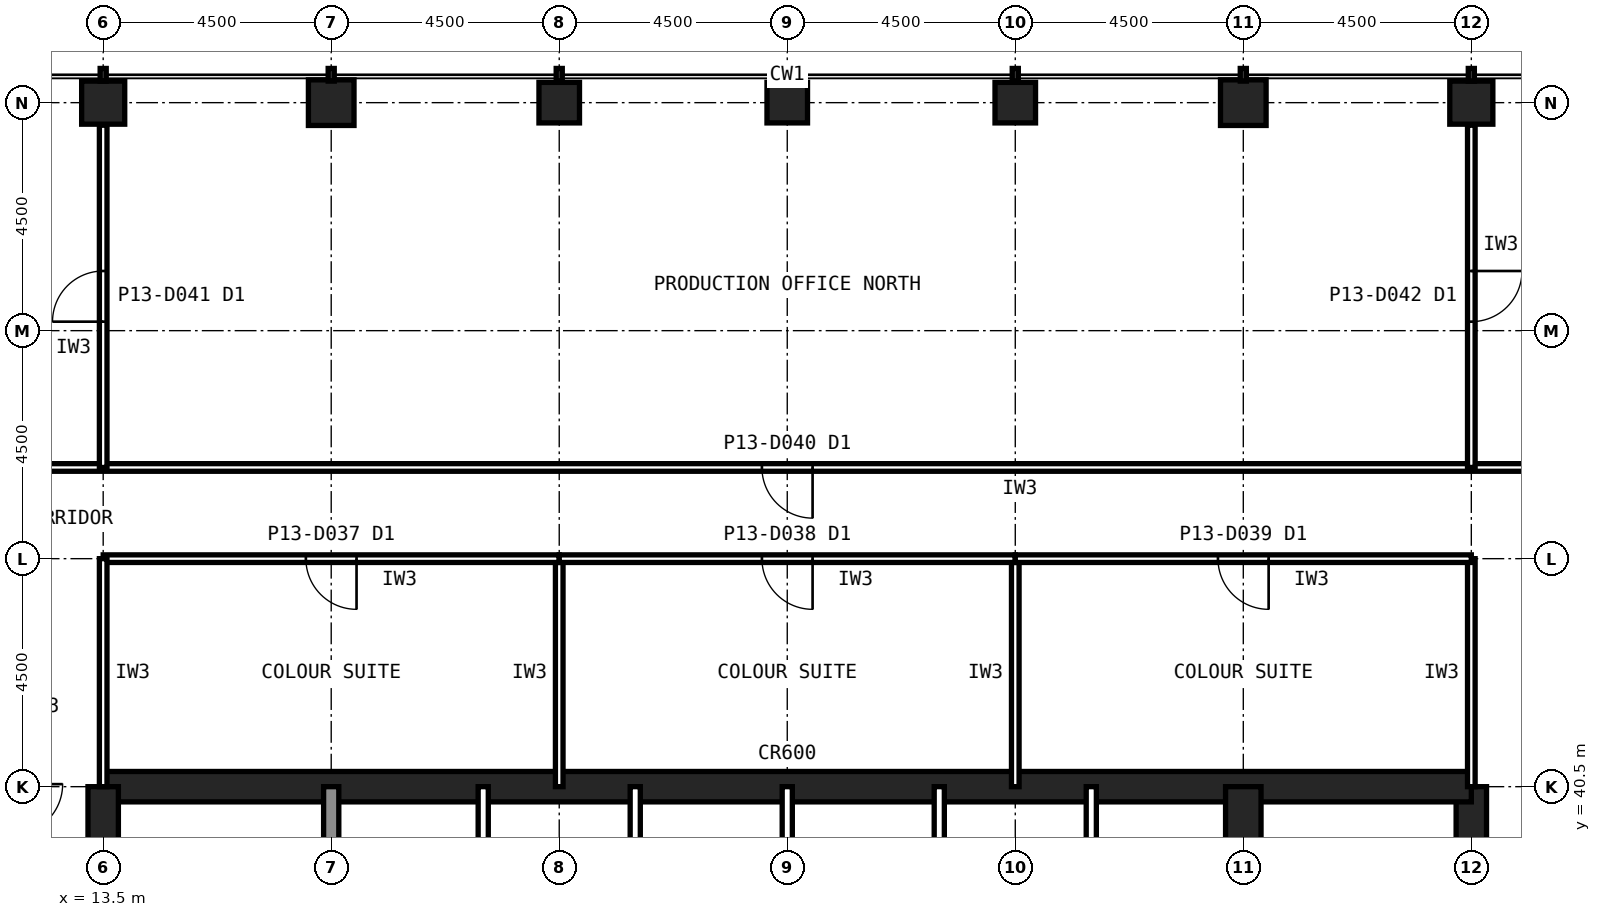
"""IFC4 building model, lengths in metres.
Left out: names, types, materials, properties, quantities, classifications, styles, units other than length and angle.
Written with IfcOpenShell. Run it as: python <this file> out.ifc"""

import sys

from ifc_helpers import new_model, si_unit, direction, frame, frame_2d, origin, origin_2d, place, context, subcontext, project, spatial, rectangle, hollow_rectangle, extrude, element, fill, save


model = new_model("IFC4")
c1 = context("Model", 3, precision=1e-05, world=origin(), true_north=direction((0.0, 1.0)))
c2 = subcontext(c1, "Body", "Model", "MODEL_VIEW")
j1 = project(units=[si_unit("LENGTHUNIT", "METRE"), si_unit("PLANEANGLEUNIT", "RADIAN")], contexts=[c1])
p1 = place(None, origin())
s1 = spatial("IfcSite", under=j1, at=p1, CompositionType="ELEMENT")
p2 = place(p1, origin())
s2 = spatial("IfcBuilding", under=s1, at=p2, CompositionType="ELEMENT")
p3 = place(p2, frame((0.0, 0.0, 54.2)))
s3 = spatial("IfcBuildingStorey", under=s2, at=p3, CompositionType="ELEMENT", Elevation=54.2)
p4 = place(p3, frame((40.5, 54.0, 0.0), z_axis=(0.0, 0.0, 1.0), x_axis=(1.0, 0.0, 0.0)))
e1 = element("IfcColumn", 1, at=p4, inside=s3, PredefinedType="COLUMN", context=c2, shape_type="SweptSolid", body=[
    extrude(hollow_rectangle(XDim=0.85, YDim=0.85, WallThickness=0.05, at=origin_2d()), origin(), (0.0, 0.0, 1.0), 4.2),
])
p5 = place(p3, frame((36.0, 54.0, 0.0), z_axis=(0.0, 0.0, 1.0), x_axis=(1.0, 0.0, 0.0)))
e2 = element("IfcColumn", 2, at=p5, inside=s3, PredefinedType="COLUMN", context=c2, shape_type="SweptSolid", body=[
    extrude(hollow_rectangle(XDim=0.9, YDim=0.9, WallThickness=0.063, at=origin_2d()), origin(), (0.0, 0.0, 1.0), 4.2),
])
for number, where, z_axis, x_axis in (
    (3, (31.5, 54.0, 0.0), (0.0, 0.0, 1.0), (1.0, 0.0, 0.0)),
    (4, (27.0, 54.0, 0.0), (0.0, 0.0, 1.0), (1.0, 0.0, 0.0)),
    (5, (22.5, 54.0, 0.0), (0.0, 0.0, 1.0), (1.0, 0.0, 0.0)),
):
    element("IfcColumn", number, at=place(p3, frame(where, z_axis=z_axis, x_axis=x_axis)), inside=s3, PredefinedType="COLUMN", context=c2, shape_type="SweptSolid", body=[
        extrude(hollow_rectangle(XDim=0.8, YDim=0.8, WallThickness=0.045, at=origin_2d()), origin(), (0.0, 0.0, 1.0), 4.2),
    ])
p6 = place(p3, frame((18.0, 54.0, 0.0), z_axis=(0.0, 0.0, 1.0), x_axis=(1.0, 0.0, 0.0)))
e6 = element("IfcColumn", 6, at=p6, inside=s3, PredefinedType="COLUMN", context=c2, shape_type="SweptSolid", body=[
    extrude(hollow_rectangle(XDim=0.9, YDim=0.9, WallThickness=0.063, at=origin_2d()), origin(), (0.0, 0.0, 1.0), 4.2),
])
p7 = place(p3, frame((13.5, 54.0, 0.0), z_axis=(0.0, 0.0, 1.0), x_axis=(1.0, 0.0, 0.0)))
e7 = element("IfcColumn", 7, at=p7, inside=s3, PredefinedType="COLUMN", context=c2, shape_type="SweptSolid", body=[
    extrude(hollow_rectangle(XDim=0.85, YDim=0.85, WallThickness=0.05, at=origin_2d()), origin(), (0.0, 0.0, 1.0), 4.2),
])
p8 = place(p3, frame((40.5, 13.5, 0.0), z_axis=(0.0, 0.0, 1.0), x_axis=(0.0, 1.0, 0.0)))
e8 = element("IfcWall", 8, at=p8, inside=s3, PredefinedType="SHEAR", context=c2, shape_type="SweptSolid", body=[
    extrude(rectangle(XDim=27.0, YDim=0.6, at=frame_2d((13.5, 0.0))), origin(), (0.0, 0.0, 1.0), 4.2),
])
p9 = place(p8, frame((5.85, 0.0, 0.0)))
e9 = element("IfcOpeningElement", 9, at=p9, cuts=e8, PredefinedType="OPENING", context=c2, shape_type="SweptSolid", body=[
    extrude(rectangle(XDim=1.8, YDim=2.1, at=frame_2d((0.9, 1.05))), frame((0.0, 0.31, 0.0), z_axis=(0.0, -1.0, 0.0), x_axis=(1.0, 0.0, 0.0)), (0.0, 0.0, 1.0), 0.62),
])
p10 = place(p8, frame((19.65, 0.0, 0.0)))
e10 = element("IfcOpeningElement", 10, at=p10, cuts=e8, PredefinedType="OPENING", context=c2, shape_type="SweptSolid", body=[
    extrude(rectangle(XDim=1.2, YDim=2.1, at=frame_2d((0.6, 1.05))), frame((0.0, 0.31, 0.0), z_axis=(0.0, -1.0, 0.0), x_axis=(1.0, 0.0, 0.0)), (0.0, 0.0, 1.0), 0.62),
])
p11 = place(p3, frame((40.5, 40.5, 0.0), z_axis=(0.0, 0.0, 1.0), x_axis=(-1.0, 0.0, 0.0)))
e11 = element("IfcWall", 11, at=p11, inside=s3, PredefinedType="SHEAR", context=c2, shape_type="SweptSolid", body=[
    extrude(rectangle(XDim=27.0, YDim=0.6, at=frame_2d((13.5, 0.0))), origin(), (0.0, 0.0, 1.0), 4.2),
])
p12 = place(p3, frame((13.5, 40.5, 0.0), z_axis=(0.0, 0.0, 1.0), x_axis=(0.0, -1.0, 0.0)))
e12 = element("IfcWall", 12, at=p12, inside=s3, PredefinedType="SHEAR", context=c2, shape_type="SweptSolid", body=[
    extrude(rectangle(XDim=27.0, YDim=0.6, at=frame_2d((13.5, 0.0))), origin(), (0.0, 0.0, 1.0), 4.2),
])
p13 = place(p12, frame((19.65, 0.0, 0.0)))
e13 = element("IfcOpeningElement", 13, at=p13, cuts=e12, PredefinedType="OPENING", context=c2, shape_type="SweptSolid", body=[
    extrude(rectangle(XDim=1.2, YDim=2.1, at=frame_2d((0.6, 1.05))), frame((0.0, 0.31, 0.0), z_axis=(0.0, -1.0, 0.0), x_axis=(1.0, 0.0, 0.0)), (0.0, 0.0, 1.0), 0.62),
])
p14 = place(p12, frame((5.85, 0.0, 0.0)))
e14 = element("IfcOpeningElement", 14, at=p14, cuts=e12, PredefinedType="OPENING", context=c2, shape_type="SweptSolid", body=[
    extrude(rectangle(XDim=1.8, YDim=2.1, at=frame_2d((0.9, 1.05))), frame((0.0, 0.31, 0.0), z_axis=(0.0, -1.0, 0.0), x_axis=(1.0, 0.0, 0.0)), (0.0, 0.0, 1.0), 0.62),
])
p15 = place(p3, frame((18.0, 36.0, 0.0), z_axis=(0.0, 0.0, 1.0), x_axis=(0.0, 1.0, 0.0)))
e15 = element("IfcWall", 15, at=p15, inside=s3, PredefinedType="SOLIDWALL", context=c2, shape_type="SweptSolid", body=[
    extrude(rectangle(XDim=4.5, YDim=0.3, at=frame_2d((2.25, 0.0))), origin(), (0.0, 0.0, 1.0), 4.04),
])
p16 = place(p3, frame((36.0, 22.5, 0.0), z_axis=(0.0, 0.0, 1.0), x_axis=(0.0, 1.0, 0.0)))
e16 = element("IfcWall", 16, at=p16, inside=s3, PredefinedType="SHEAR", context=c2, shape_type="SweptSolid", body=[
    extrude(rectangle(XDim=18.0, YDim=0.7, at=frame_2d((9.0, 0.0))), origin(), (0.0, 0.0, 1.0), 4.2),
])
for number, where, z_axis, x_axis in (
    (17, (21.0, 36.0, 0.0), (0.0, 0.0, 1.0), (0.0, 1.0, 0.0)),
    (18, (24.0, 36.0, 0.0), (0.0, 0.0, 1.0), (0.0, 1.0, 0.0)),
    (19, (27.0, 36.0, 0.0), (0.0, 0.0, 1.0), (0.0, 1.0, 0.0)),
    (20, (30.0, 36.0, 0.0), (0.0, 0.0, 1.0), (0.0, 1.0, 0.0)),
    (21, (33.0, 36.0, 0.0), (0.0, 0.0, 1.0), (0.0, 1.0, 0.0)),
):
    element("IfcWall", number, at=place(p3, frame(where, z_axis=z_axis, x_axis=x_axis)), inside=s3, PredefinedType="PARTITIONING", context=c2, shape_type="SweptSolid", body=[
        extrude(rectangle(XDim=4.5, YDim=0.2, at=frame_2d((2.25, 0.0))), origin(), (0.0, 0.0, 1.0), 4.04),
    ])
for number, where, z_axis, x_axis in (
    (22, (13.5, 40.5, 0.0), (0.0, 0.0, 1.0), (-1.0, 0.0, 0.0)),
    (23, (42.3, 40.5, 0.0), (0.0, 0.0, 1.0), (-1.0, 0.0, 0.0)),
):
    element("IfcWall", number, at=place(p3, frame(where, z_axis=z_axis, x_axis=x_axis)), inside=s3, PredefinedType="PARTITIONING", context=c2, shape_type="SweptSolid", body=[
        extrude(rectangle(XDim=1.8, YDim=0.15, at=frame_2d((0.9, 0.0))), origin(), (0.0, 0.0, 1.0), 3.189),
    ])
p17 = place(p3, frame((22.5, 40.5, 0.0), z_axis=(0.0, 0.0, 1.0), x_axis=(0.0, 1.0, 0.0)))
e24 = element("IfcWall", 24, at=p17, inside=s3, PredefinedType="PARTITIONING", context=c2, shape_type="SweptSolid", body=[
    extrude(rectangle(XDim=4.5, YDim=0.15, at=frame_2d((2.25, 0.0))), origin(), (0.0, 0.0, 1.0), 3.189),
])
p18 = place(p3, frame((22.5, 45.0, 0.0), z_axis=(0.0, 0.0, 1.0), x_axis=(-1.0, 0.0, 0.0)))
e25 = element("IfcWall", 25, at=p18, inside=s3, PredefinedType="PARTITIONING", context=c2, shape_type="SweptSolid", body=[
    extrude(rectangle(XDim=9.0, YDim=0.15, at=frame_2d((4.5, 0.0))), origin(), (0.0, 0.0, 1.0), 4.04),
])
p19 = place(p18, frame((4.0, 0.0, 0.0)))
e26 = element("IfcOpeningElement", 26, at=p19, cuts=e25, PredefinedType="OPENING", context=c2, shape_type="SweptSolid", body=[
    extrude(rectangle(XDim=1.0, YDim=2.1, at=frame_2d((0.5, 1.05))), frame((0.0, 0.085, 0.0), z_axis=(0.0, -1.0, 0.0), x_axis=(1.0, 0.0, 0.0)), (0.0, 0.0, 1.0), 0.17),
])
for number, where, z_axis, x_axis in (
    (27, (13.5, 45.0, 0.0), (0.0, 0.0, 1.0), (0.0, -1.0, 0.0)),
    (28, (31.5, 40.5, 0.0), (0.0, 0.0, 1.0), (0.0, 1.0, 0.0)),
):
    element("IfcWall", number, at=place(p3, frame(where, z_axis=z_axis, x_axis=x_axis)), inside=s3, PredefinedType="PARTITIONING", context=c2, shape_type="SweptSolid", body=[
        extrude(rectangle(XDim=4.5, YDim=0.15, at=frame_2d((2.25, 0.0))), origin(), (0.0, 0.0, 1.0), 3.189),
    ])
p20 = place(p3, frame((31.5, 45.0, 0.0), z_axis=(0.0, 0.0, 1.0), x_axis=(-1.0, 0.0, 0.0)))
e29 = element("IfcWall", 29, at=p20, inside=s3, PredefinedType="PARTITIONING", context=c2, shape_type="SweptSolid", body=[
    extrude(rectangle(XDim=9.0, YDim=0.15, at=frame_2d((4.5, 0.0))), origin(), (0.0, 0.0, 1.0), 4.04),
])
p21 = place(p20, frame((4.0, 0.0, 0.0)))
e30 = element("IfcOpeningElement", 30, at=p21, cuts=e29, PredefinedType="OPENING", context=c2, shape_type="SweptSolid", body=[
    extrude(rectangle(XDim=1.0, YDim=2.1, at=frame_2d((0.5, 1.05))), frame((0.0, 0.085, 0.0), z_axis=(0.0, -1.0, 0.0), x_axis=(1.0, 0.0, 0.0)), (0.0, 0.0, 1.0), 0.17),
])
p22 = place(p3, frame((40.5, 40.5, 0.0), z_axis=(0.0, 0.0, 1.0), x_axis=(0.0, 1.0, 0.0)))
e31 = element("IfcWall", 31, at=p22, inside=s3, PredefinedType="PARTITIONING", context=c2, shape_type="SweptSolid", body=[
    extrude(rectangle(XDim=4.5, YDim=0.15, at=frame_2d((2.25, 0.0))), origin(), (0.0, 0.0, 1.0), 3.189),
])
p23 = place(p3, frame((40.5, 45.0, 0.0), z_axis=(0.0, 0.0, 1.0), x_axis=(-1.0, 0.0, 0.0)))
e32 = element("IfcWall", 32, at=p23, inside=s3, PredefinedType="PARTITIONING", context=c2, shape_type="SweptSolid", body=[
    extrude(rectangle(XDim=9.0, YDim=0.15, at=frame_2d((4.5, 0.0))), origin(), (0.0, 0.0, 1.0), 4.04),
])
p24 = place(p23, frame((4.0, 0.0, 0.0)))
e33 = element("IfcOpeningElement", 33, at=p24, cuts=e32, PredefinedType="OPENING", context=c2, shape_type="SweptSolid", body=[
    extrude(rectangle(XDim=1.0, YDim=2.1, at=frame_2d((0.5, 1.05))), frame((0.0, 0.085, 0.0), z_axis=(0.0, -1.0, 0.0), x_axis=(1.0, 0.0, 0.0)), (0.0, 0.0, 1.0), 0.17),
])
p25 = place(p3, frame((40.5, 53.555, 0.0), z_axis=(0.0, 0.0, 1.0), x_axis=(0.0, -1.0, 0.0)))
e34 = element("IfcWall", 34, at=p25, inside=s3, PredefinedType="PARTITIONING", context=c2, shape_type="SweptSolid", body=[
    extrude(rectangle(XDim=8.555, YDim=0.15, at=frame_2d((4.277, 0.0))), origin(), (0.0, 0.0, 1.0), 3.189),
])
p26 = place(p25, frame((3.778, 0.0, 0.0)))
e35 = element("IfcOpeningElement", 35, at=p26, cuts=e34, PredefinedType="OPENING", context=c2, shape_type="SweptSolid", body=[
    extrude(rectangle(XDim=1.0, YDim=2.1, at=frame_2d((0.5, 1.05))), frame((0.0, 0.085, 0.0), z_axis=(0.0, -1.0, 0.0), x_axis=(1.0, 0.0, 0.0)), (0.0, 0.0, 1.0), 0.17),
])
p27 = place(p3, frame((13.5, 45.0, 0.0), z_axis=(0.0, 0.0, 1.0), x_axis=(0.0, 1.0, 0.0)))
e36 = element("IfcWall", 36, at=p27, inside=s3, PredefinedType="PARTITIONING", context=c2, shape_type="SweptSolid", body=[
    extrude(rectangle(XDim=8.555, YDim=0.15, at=frame_2d((4.277, 0.0))), origin(), (0.0, 0.0, 1.0), 3.189),
])
p28 = place(p27, frame((3.778, 0.0, 0.0)))
e37 = element("IfcOpeningElement", 37, at=p28, cuts=e36, PredefinedType="OPENING", context=c2, shape_type="SweptSolid", body=[
    extrude(rectangle(XDim=1.0, YDim=2.1, at=frame_2d((0.5, 1.05))), frame((0.0, 0.085, 0.0), z_axis=(0.0, -1.0, 0.0), x_axis=(1.0, 0.0, 0.0)), (0.0, 0.0, 1.0), 0.17),
])
p29 = place(p19, origin())
e38 = element("IfcDoor", 38, at=p29, inside=s3, OperationType="SINGLE_SWING_LEFT", PredefinedType="DOOR", context=c2, shape_type="SweptSolid", body=[
    extrude(rectangle(XDim=1.0, YDim=2.1, at=frame_2d((0.5, 1.05))), frame((0.0, 0.025, 0.0), z_axis=(0.0, -1.0, 0.0), x_axis=(1.0, 0.0, 0.0)), (0.0, 0.0, 1.0), 0.05),
])
fill(e26, e38)
p30 = place(p21, origin())
e39 = element("IfcDoor", 39, at=p30, inside=s3, OperationType="SINGLE_SWING_LEFT", PredefinedType="DOOR", context=c2, shape_type="SweptSolid", body=[
    extrude(rectangle(XDim=1.0, YDim=2.1, at=frame_2d((0.5, 1.05))), frame((0.0, 0.025, 0.0), z_axis=(0.0, -1.0, 0.0), x_axis=(1.0, 0.0, 0.0)), (0.0, 0.0, 1.0), 0.05),
])
fill(e30, e39)
p31 = place(p24, origin())
e40 = element("IfcDoor", 40, at=p31, inside=s3, OperationType="SINGLE_SWING_LEFT", PredefinedType="DOOR", context=c2, shape_type="SweptSolid", body=[
    extrude(rectangle(XDim=1.0, YDim=2.1, at=frame_2d((0.5, 1.05))), frame((0.0, 0.025, 0.0), z_axis=(0.0, -1.0, 0.0), x_axis=(1.0, 0.0, 0.0)), (0.0, 0.0, 1.0), 0.05),
])
fill(e33, e40)
p32 = place(p26, origin())
e41 = element("IfcDoor", 41, at=p32, inside=s3, OperationType="SINGLE_SWING_LEFT", PredefinedType="DOOR", context=c2, shape_type="SweptSolid", body=[
    extrude(rectangle(XDim=1.0, YDim=2.1, at=frame_2d((0.5, 1.05))), frame((0.0, 0.025, 0.0), z_axis=(0.0, -1.0, 0.0), x_axis=(1.0, 0.0, 0.0)), (0.0, 0.0, 1.0), 0.05),
])
fill(e35, e41)
p33 = place(p28, origin())
e42 = element("IfcDoor", 42, at=p33, inside=s3, OperationType="SINGLE_SWING_LEFT", PredefinedType="DOOR", context=c2, shape_type="SweptSolid", body=[
    extrude(rectangle(XDim=1.0, YDim=2.1, at=frame_2d((0.5, 1.05))), frame((0.0, 0.025, 0.0), z_axis=(0.0, -1.0, 0.0), x_axis=(1.0, 0.0, 0.0)), (0.0, 0.0, 1.0), 0.05),
])
fill(e37, e42)
save(model, sys.argv[1])
